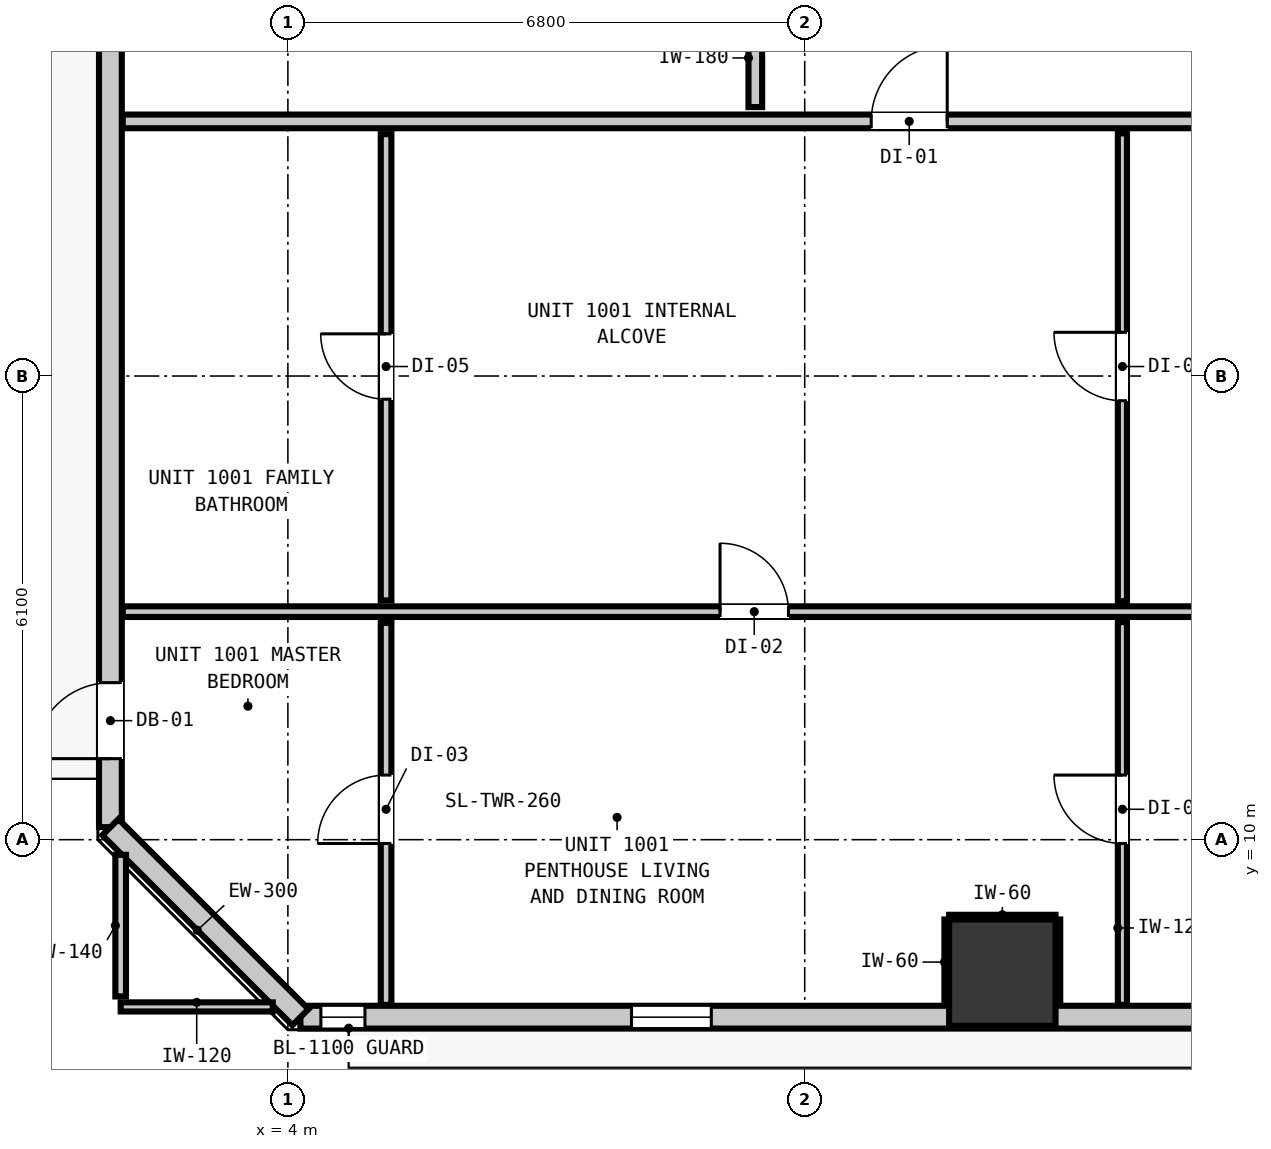
"""IFC4 building model, lengths in metres.
Left out: names, types, materials, properties, quantities, classifications, styles, units other than length and angle.
Written with IfcOpenShell. Run it as: python <this file> out.ifc"""

import sys

from ifc_helpers import new_model, si_unit, direction, frame, frame_2d, origin, origin_2d, place, context, subcontext, project, spatial, rectangle, extrude, element, fill, save


model = new_model("IFC4")
c1 = context("Model", 3, precision=1e-05, world=origin(), true_north=direction((0.0, 1.0)))
c2 = subcontext(c1, "Body", "Model", "MODEL_VIEW")
j1 = project(units=[si_unit("LENGTHUNIT", "METRE"), si_unit("PLANEANGLEUNIT", "RADIAN")], contexts=[c1])
p1 = place(None, origin())
s1 = spatial("IfcSite", under=j1, at=p1, CompositionType="ELEMENT")
p2 = place(p1, origin())
s2 = spatial("IfcBuilding", under=s1, at=p2, CompositionType="ELEMENT")
p3 = place(p2, frame((0.0, 0.0, 38.6)))
s3 = spatial("IfcBuildingStorey", under=s2, at=p3, CompositionType="ELEMENT", Elevation=38.6)
p4 = place(p3, frame((13.4, 8.25, 0.0), z_axis=(0.0, 0.0, 1.0), x_axis=(1.0, 0.0, 0.0)))
e1 = element("IfcColumn", 1, at=p4, inside=s3, PredefinedType="COLUMN", context=c2, shape_type="SweptSolid", body=[
    extrude(rectangle(XDim=1.4, YDim=1.4, at=origin_2d()), origin(), (0.0, 0.0, 1.0), 2.9),
])
p5 = place(p3, frame((1.665, 10.165, 0.0), z_axis=(0.0, 0.0, 1.0), x_axis=(0.0, 1.0, 0.0)))
e2 = element("IfcWall", 2, at=p5, inside=s3, PredefinedType="STANDARD", context=c2, shape_type="SweptSolid", body=[
    extrude(rectangle(XDim=34.67, YDim=0.3, at=frame_2d((17.335, 0.0))), origin(), (0.0, 0.0, 1.0), 2.9),
])
p6 = place(p5, frame((0.901, 0.0, 0.0)))
e3 = element("IfcOpeningElement", 3, at=p6, cuts=e2, PredefinedType="OPENING", context=c2, shape_type="SweptSolid", body=[
    extrude(rectangle(XDim=1.0, YDim=2.15, at=frame_2d((0.5, 1.075))), frame((0.0, 0.16, 0.0), z_axis=(0.0, -1.0, 0.0), x_axis=(1.0, 0.0, 0.0)), (0.0, 0.0, 1.0), 0.32),
])
p7 = place(p5, frame((32.708, 0.0, 0.85)))
e4 = element("IfcOpeningElement", 4, at=p7, cuts=e2, PredefinedType="OPENING", context=c2, shape_type="SweptSolid", body=[
    extrude(rectangle(XDim=1.05, YDim=1.65, at=frame_2d((0.525, 0.825))), frame((0.0, 0.16, 0.0), z_axis=(0.0, -1.0, 0.0), x_axis=(1.0, 0.0, 0.0)), (0.0, 0.0, 1.0), 0.32),
])
p8 = place(p5, frame((15.66, 0.0, 0.85)))
e5 = element("IfcOpeningElement", 5, at=p8, cuts=e2, PredefinedType="OPENING", context=c2, shape_type="SweptSolid", body=[
    extrude(rectangle(XDim=1.05, YDim=1.65, at=frame_2d((0.525, 0.825))), frame((0.0, 0.16, 0.0), z_axis=(0.0, -1.0, 0.0), x_axis=(1.0, 0.0, 0.0)), (0.0, 0.0, 1.0), 0.32),
])
p9 = place(p3, frame((41.635, 7.665, 0.0), z_axis=(0.0, 0.0, 1.0), x_axis=(-1.0, 0.0, 0.0)))
e6 = element("IfcWall", 6, at=p9, inside=s3, PredefinedType="STANDARD", context=c2, shape_type="SweptSolid", body=[
    extrude(rectangle(XDim=37.47, YDim=0.3, at=frame_2d((18.735, 0.0))), origin(), (0.0, 0.0, 1.0), 2.9),
])
p10 = place(p9, frame((0.901, 0.0, 0.0)))
e7 = element("IfcOpeningElement", 7, at=p10, cuts=e6, PredefinedType="OPENING", context=c2, shape_type="SweptSolid", body=[
    extrude(rectangle(XDim=1.0, YDim=2.15, at=frame_2d((0.5, 1.075))), frame((0.0, 0.16, 0.0), z_axis=(0.0, -1.0, 0.0), x_axis=(1.0, 0.0, 0.0)), (0.0, 0.0, 1.0), 0.32),
])
p11 = place(p9, frame((32.064, 0.0, 0.85)))
e8 = element("IfcOpeningElement", 8, at=p11, cuts=e6, PredefinedType="OPENING", context=c2, shape_type="SweptSolid", body=[
    extrude(rectangle(XDim=1.05, YDim=1.65, at=frame_2d((0.525, 0.825))), frame((0.0, 0.16, 0.0), z_axis=(0.0, -1.0, 0.0), x_axis=(1.0, 0.0, 0.0)), (0.0, 0.0, 1.0), 0.32),
])
p12 = place(p9, frame((36.621, 0.0, 0.85)))
e9 = element("IfcOpeningElement", 9, at=p12, cuts=e6, PredefinedType="OPENING", context=c2, shape_type="SweptSolid", body=[
    extrude(rectangle(XDim=0.58, YDim=1.5, at=frame_2d((0.29, 0.75))), frame((0.0, 0.16, 0.0), z_axis=(0.0, -1.0, 0.0), x_axis=(1.0, 0.0, 0.0)), (0.0, 0.0, 1.0), 0.32),
])
p13 = place(p9, frame((23.52, 0.0, 0.85)))
e10 = element("IfcOpeningElement", 10, at=p13, cuts=e6, PredefinedType="OPENING", context=c2, shape_type="SweptSolid", body=[
    extrude(rectangle(XDim=1.05, YDim=1.65, at=frame_2d((0.525, 0.825))), frame((0.0, 0.16, 0.0), z_axis=(0.0, -1.0, 0.0), x_axis=(1.0, 0.0, 0.0)), (0.0, 0.0, 1.0), 0.32),
])
p14 = place(p9, frame((17.07, 0.0, 0.85)))
e11 = element("IfcOpeningElement", 11, at=p14, cuts=e6, PredefinedType="OPENING", context=c2, shape_type="SweptSolid", body=[
    extrude(rectangle(XDim=1.05, YDim=1.65, at=frame_2d((0.525, 0.825))), frame((0.0, 0.16, 0.0), z_axis=(0.0, -1.0, 0.0), x_axis=(1.0, 0.0, 0.0)), (0.0, 0.0, 1.0), 0.32),
])
p15 = place(p9, frame((8.26, 0.0, 0.85)))
e12 = element("IfcOpeningElement", 12, at=p15, cuts=e6, PredefinedType="OPENING", context=c2, shape_type="SweptSolid", body=[
    extrude(rectangle(XDim=1.05, YDim=1.65, at=frame_2d((0.525, 0.825))), frame((0.0, 0.16, 0.0), z_axis=(0.0, -1.0, 0.0), x_axis=(1.0, 0.0, 0.0)), (0.0, 0.0, 1.0), 0.32),
])
p16 = place(p3, frame((4.165, 7.665, 0.0), z_axis=(0.0, 0.0, 1.0), x_axis=(-0.707106781187, 0.707106781187, 0.0)))
e13 = element("IfcWall", 13, at=p16, inside=s3, PredefinedType="STANDARD", context=c2, shape_type="SweptSolid", body=[
    extrude(rectangle(XDim=3.536, YDim=0.3, at=frame_2d((1.768, 0.0))), origin(), (0.0, 0.0, 1.0), 2.9),
])
p17 = place(p3, frame((1.827, 19.45, 0.0), z_axis=(0.0, 0.0, 1.0), x_axis=(1.0, 0.0, 0.0)))
e14 = element("IfcWall", 14, at=p17, inside=s3, PredefinedType="PARTITIONING", context=c2, shape_type="SweptSolid", body=[
    extrude(rectangle(XDim=42.146, YDim=0.18, at=frame_2d((21.073, 0.0))), origin(), (0.0, 0.0, 1.0), 2.9),
])
p18 = place(p17, frame((9.848, 0.0, 0.0)))
e15 = element("IfcOpeningElement", 15, at=p18, cuts=e14, PredefinedType="OPENING", context=c2, shape_type="SweptSolid", body=[
    extrude(rectangle(XDim=1.0, YDim=2.15, at=frame_2d((0.5, 1.075))), frame((0.0, 0.1, 0.0), z_axis=(0.0, -1.0, 0.0), x_axis=(1.0, 0.0, 0.0)), (0.0, 0.0, 1.0), 0.2),
])
p19 = place(p17, frame((33.038, 0.0, 0.0)))
e16 = element("IfcOpeningElement", 16, at=p19, cuts=e14, PredefinedType="OPENING", context=c2, shape_type="SweptSolid", body=[
    extrude(rectangle(XDim=0.9, YDim=2.1, at=frame_2d((0.45, 1.05))), frame((0.0, 0.1, 0.0), z_axis=(0.0, -1.0, 0.0), x_axis=(1.0, 0.0, 0.0)), (0.0, 0.0, 1.0), 0.2),
])
p20 = place(p3, frame((1.827, 13.0, 0.0), z_axis=(0.0, 0.0, 1.0), x_axis=(1.0, 0.0, 0.0)))
e17 = element("IfcWall", 17, at=p20, inside=s3, PredefinedType="PARTITIONING", context=c2, shape_type="SweptSolid", body=[
    extrude(rectangle(XDim=24.852, YDim=0.14, at=frame_2d((12.426, 0.0))), origin(), (0.0, 0.0, 1.0), 2.9),
])
p21 = place(p20, frame((7.859, 0.0, 0.0)))
e18 = element("IfcOpeningElement", 18, at=p21, cuts=e17, PredefinedType="OPENING", context=c2, shape_type="SweptSolid", body=[
    extrude(rectangle(XDim=0.9, YDim=2.1, at=frame_2d((0.45, 1.05))), frame((0.0, 0.08, 0.0), z_axis=(0.0, -1.0, 0.0), x_axis=(1.0, 0.0, 0.0)), (0.0, 0.0, 1.0), 0.16),
])
p22 = place(p20, frame((21.477, 0.0, 0.0)))
e19 = element("IfcOpeningElement", 19, at=p22, cuts=e17, PredefinedType="OPENING", context=c2, shape_type="SweptSolid", body=[
    extrude(rectangle(XDim=0.9, YDim=2.1, at=frame_2d((0.45, 1.05))), frame((0.0, 0.08, 0.0), z_axis=(0.0, -1.0, 0.0), x_axis=(1.0, 0.0, 0.0)), (0.0, 0.0, 1.0), 0.16),
])
p23 = place(p20, frame((22.517, 0.0, 0.0)))
e20 = element("IfcOpeningElement", 20, at=p23, cuts=e17, PredefinedType="OPENING", context=c2, shape_type="SweptSolid", body=[
    extrude(rectangle(XDim=0.9, YDim=2.1, at=frame_2d((0.45, 1.05))), frame((0.0, 0.08, 0.0), z_axis=(0.0, -1.0, 0.0), x_axis=(1.0, 0.0, 0.0)), (0.0, 0.0, 1.0), 0.16),
])
p24 = place(p3, frame((1.8, 7.8, 0.0), z_axis=(0.0, 0.0, 1.0), x_axis=(1.0, 0.0, 0.0)))
e21 = element("IfcWall", 21, at=p24, inside=s3, PredefinedType="PARTITIONING", context=c2, shape_type="SweptSolid", body=[
    extrude(rectangle(XDim=2.001, YDim=0.12, at=frame_2d((1.0, 0.0))), origin(), (0.0, 0.0, 1.0), 2.9),
])
p25 = place(p3, frame((10.15, 19.638, 0.0), z_axis=(0.0, 0.0, 1.0), x_axis=(0.0, 1.0, 0.0)))
e22 = element("IfcWall", 22, at=p25, inside=s3, PredefinedType="PARTITIONING", context=c2, shape_type="SweptSolid", body=[
    extrude(rectangle(XDim=1.294, YDim=0.18, at=frame_2d((0.647, 0.0))), origin(), (0.0, 0.0, 1.0), 2.9),
])
p26 = place(p3, frame((1.8, 7.938, 0.0), z_axis=(0.0, 0.0, 1.0), x_axis=(0.0, 1.0, 0.0)))
e23 = element("IfcWall", 23, at=p26, inside=s3, PredefinedType="PARTITIONING", context=c2, shape_type="SweptSolid", body=[
    extrude(rectangle(XDim=1.863, YDim=0.14, at=frame_2d((0.932, 0.0))), origin(), (0.0, 0.0, 1.0), 2.9),
])
p27 = place(p3, frame((5.292, 7.827, 0.0), z_axis=(0.0, 0.0, 1.0), x_axis=(0.0, 1.0, 0.0)))
e24 = element("IfcWall", 24, at=p27, inside=s3, PredefinedType="PARTITIONING", context=c2, shape_type="SweptSolid", body=[
    extrude(rectangle(XDim=5.025, YDim=0.14, at=frame_2d((2.513, 0.0))), origin(), (0.0, 0.0, 1.0), 2.9),
])
p28 = place(p27, frame((2.123, 0.0, 0.0)))
e25 = element("IfcOpeningElement", 25, at=p28, cuts=e24, PredefinedType="OPENING", context=c2, shape_type="SweptSolid", body=[
    extrude(rectangle(XDim=0.9, YDim=2.1, at=frame_2d((0.45, 1.05))), frame((0.0, 0.08, 0.0), z_axis=(0.0, -1.0, 0.0), x_axis=(1.0, 0.0, 0.0)), (0.0, 0.0, 1.0), 0.16),
])
p29 = place(p3, frame((5.292, 13.148, 0.0), z_axis=(0.0, 0.0, 1.0), x_axis=(0.0, 1.0, 0.0)))
e26 = element("IfcWall", 26, at=p29, inside=s3, PredefinedType="PARTITIONING", context=c2, shape_type="SweptSolid", body=[
    extrude(rectangle(XDim=6.134, YDim=0.14, at=frame_2d((3.067, 0.0))), origin(), (0.0, 0.0, 1.0), 2.9),
])
p30 = place(p29, frame((2.647, 0.0, 0.0)))
e27 = element("IfcOpeningElement", 27, at=p30, cuts=e26, PredefinedType="OPENING", context=c2, shape_type="SweptSolid", body=[
    extrude(rectangle(XDim=0.86, YDim=2.02, at=frame_2d((0.43, 1.01))), frame((0.0, 0.08, 0.0), z_axis=(0.0, -1.0, 0.0), x_axis=(1.0, 0.0, 0.0)), (0.0, 0.0, 1.0), 0.16),
])
p31 = place(p3, frame((14.98, 7.827, 0.0), z_axis=(0.0, 0.0, 1.0), x_axis=(0.0, 1.0, 0.0)))
e28 = element("IfcWall", 28, at=p31, inside=s3, PredefinedType="PARTITIONING", context=c2, shape_type="SweptSolid", body=[
    extrude(rectangle(XDim=5.035, YDim=0.12, at=frame_2d((2.518, 0.0))), origin(), (0.0, 0.0, 1.0), 2.9),
])
p32 = place(p31, frame((2.123, 0.0, 0.0)))
e29 = element("IfcOpeningElement", 29, at=p32, cuts=e28, PredefinedType="OPENING", context=c2, shape_type="SweptSolid", body=[
    extrude(rectangle(XDim=0.9, YDim=2.1, at=frame_2d((0.45, 1.05))), frame((0.0, 0.07, 0.0), z_axis=(0.0, -1.0, 0.0), x_axis=(1.0, 0.0, 0.0)), (0.0, 0.0, 1.0), 0.14),
])
p33 = place(p3, frame((14.98, 13.138, 0.0), z_axis=(0.0, 0.0, 1.0), x_axis=(0.0, 1.0, 0.0)))
e30 = element("IfcWall", 30, at=p33, inside=s3, PredefinedType="PARTITIONING", context=c2, shape_type="SweptSolid", body=[
    extrude(rectangle(XDim=6.154, YDim=0.12, at=frame_2d((3.077, 0.0))), origin(), (0.0, 0.0, 1.0), 2.9),
])
p34 = place(p33, frame((2.637, 0.0, 0.0)))
e31 = element("IfcOpeningElement", 31, at=p34, cuts=e30, PredefinedType="OPENING", context=c2, shape_type="SweptSolid", body=[
    extrude(rectangle(XDim=0.9, YDim=2.1, at=frame_2d((0.45, 1.05))), frame((0.0, 0.07, 0.0), z_axis=(0.0, -1.0, 0.0), x_axis=(1.0, 0.0, 0.0)), (0.0, 0.0, 1.0), 0.14),
])
p35 = place(p3, frame((12.7, 8.982, 0.0), z_axis=(0.0, 0.0, 1.0), x_axis=(1.0, 0.0, 0.0)))
e32 = element("IfcWall", 32, at=p35, inside=s3, PredefinedType="PARTITIONING", context=c2, shape_type="SweptSolid", body=[
    extrude(rectangle(XDim=1.4, YDim=0.06, at=frame_2d((0.7, 0.0))), origin(), (0.0, 0.0, 1.0), 1.45),
])
for number, where, z_axis, x_axis in (
    (33, (12.668, 7.83, 0.0), (0.0, 0.0, 1.0), (0.0, 1.0, 0.0)),
    (34, (14.132, 7.83, 0.0), (0.0, 0.0, 1.0), (0.0, 1.0, 0.0)),
):
    element("IfcWall", number, at=place(p3, frame(where, z_axis=z_axis, x_axis=x_axis)), inside=s3, PredefinedType="PARTITIONING", context=c2, shape_type="SweptSolid", body=[
        extrude(rectangle(XDim=1.12, YDim=0.06, at=frame_2d((0.56, 0.0))), origin(), (0.0, 0.0, 1.0), 1.45),
    ])
p36 = place(p6, origin())
e35 = element("IfcDoor", 35, at=p36, inside=s3, OperationType="SINGLE_SWING_LEFT", PredefinedType="DOOR", context=c2, shape_type="SweptSolid", body=[
    extrude(rectangle(XDim=1.0, YDim=2.15, at=frame_2d((0.5, 1.075))), frame((0.0, 0.025, 0.0), z_axis=(0.0, -1.0, 0.0), x_axis=(1.0, 0.0, 0.0)), (0.0, 0.0, 1.0), 0.05),
])
fill(e3, e35)
p37 = place(p11, origin())
e36 = element("IfcWindow", 36, at=p37, inside=s3, PartitioningType="SINGLE_PANEL", PredefinedType="WINDOW", context=c2, shape_type="SweptSolid", body=[
    extrude(rectangle(XDim=1.05, YDim=1.65, at=frame_2d((0.525, 0.825))), frame((0.0, 0.03, 0.0), z_axis=(0.0, -1.0, 0.0), x_axis=(1.0, 0.0, 0.0)), (0.0, 0.0, 1.0), 0.06),
])
fill(e8, e36)
p38 = place(p12, origin())
e37 = element("IfcWindow", 37, at=p38, inside=s3, PartitioningType="SINGLE_PANEL", PredefinedType="WINDOW", context=c2, shape_type="SweptSolid", body=[
    extrude(rectangle(XDim=0.58, YDim=1.5, at=frame_2d((0.29, 0.75))), frame((0.0, 0.03, 0.0), z_axis=(0.0, -1.0, 0.0), x_axis=(1.0, 0.0, 0.0)), (0.0, 0.0, 1.0), 0.06),
])
fill(e9, e37)
p39 = place(p18, origin())
e38 = element("IfcDoor", 38, at=p39, inside=s3, OperationType="SINGLE_SWING_RIGHT", PredefinedType="DOOR", context=c2, shape_type="SweptSolid", body=[
    extrude(rectangle(XDim=1.0, YDim=2.15, at=frame_2d((0.5, 1.075))), frame((0.0, 0.025, 0.0), z_axis=(0.0, -1.0, 0.0), x_axis=(1.0, 0.0, 0.0)), (0.0, 0.0, 1.0), 0.05),
])
fill(e15, e38)
p40 = place(p21, origin())
e39 = element("IfcDoor", 39, at=p40, inside=s3, OperationType="SINGLE_SWING_LEFT", PredefinedType="DOOR", context=c2, shape_type="SweptSolid", body=[
    extrude(rectangle(XDim=0.9, YDim=2.1, at=frame_2d((0.45, 1.05))), frame((0.0, 0.025, 0.0), z_axis=(0.0, -1.0, 0.0), x_axis=(1.0, 0.0, 0.0)), (0.0, 0.0, 1.0), 0.05),
])
fill(e18, e39)
p41 = place(p30, origin())
e40 = element("IfcDoor", 40, at=p41, inside=s3, OperationType="SINGLE_SWING_RIGHT", PredefinedType="DOOR", context=c2, shape_type="SweptSolid", body=[
    extrude(rectangle(XDim=0.86, YDim=2.02, at=frame_2d((0.43, 1.01))), frame((0.0, 0.025, 0.0), z_axis=(0.0, -1.0, 0.0), x_axis=(1.0, 0.0, 0.0)), (0.0, 0.0, 1.0), 0.05),
])
fill(e27, e40)
p42 = place(p28, origin())
e41 = element("IfcDoor", 41, at=p42, inside=s3, OperationType="SINGLE_SWING_LEFT", PredefinedType="DOOR", context=c2, shape_type="SweptSolid", body=[
    extrude(rectangle(XDim=0.9, YDim=2.1, at=frame_2d((0.45, 1.05))), frame((0.0, 0.025, 0.0), z_axis=(0.0, -1.0, 0.0), x_axis=(1.0, 0.0, 0.0)), (0.0, 0.0, 1.0), 0.05),
])
fill(e25, e41)
p43 = place(p34, origin())
e42 = element("IfcDoor", 42, at=p43, inside=s3, OperationType="SINGLE_SWING_RIGHT", PredefinedType="DOOR", context=c2, shape_type="SweptSolid", body=[
    extrude(rectangle(XDim=0.9, YDim=2.1, at=frame_2d((0.45, 1.05))), frame((0.0, 0.025, 0.0), z_axis=(0.0, -1.0, 0.0), x_axis=(1.0, 0.0, 0.0)), (0.0, 0.0, 1.0), 0.05),
])
fill(e31, e42)
p44 = place(p32, origin())
e43 = element("IfcDoor", 43, at=p44, inside=s3, OperationType="SINGLE_SWING_RIGHT", PredefinedType="DOOR", context=c2, shape_type="SweptSolid", body=[
    extrude(rectangle(XDim=0.9, YDim=2.1, at=frame_2d((0.45, 1.05))), frame((0.0, 0.025, 0.0), z_axis=(0.0, -1.0, 0.0), x_axis=(1.0, 0.0, 0.0)), (0.0, 0.0, 1.0), 0.05),
])
fill(e29, e43)
save(model, sys.argv[1])
